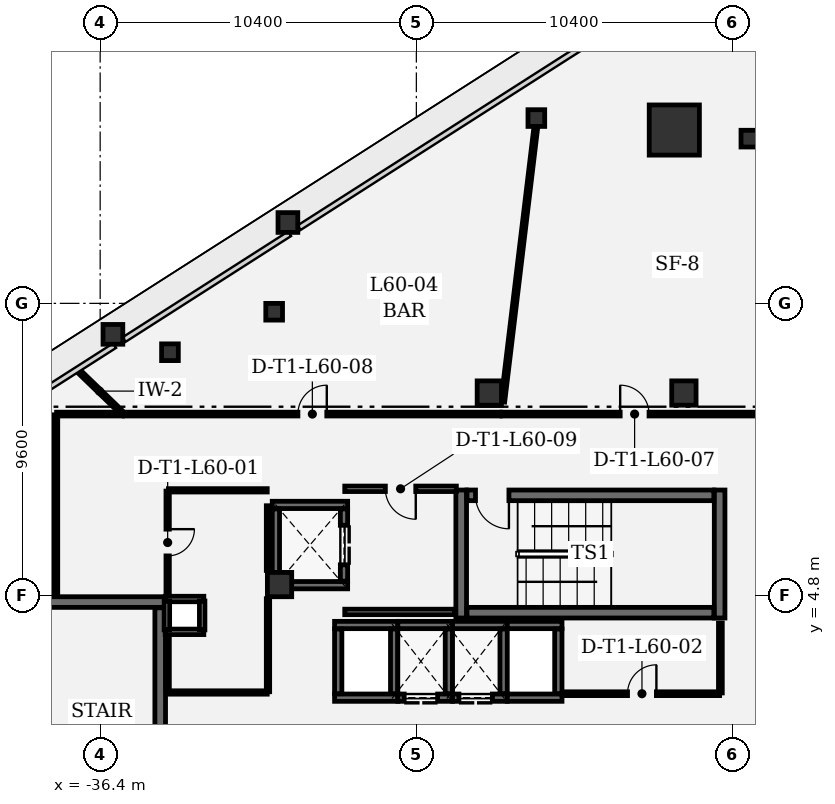
"""IFC4 building model, lengths in metres.
Left out: names, types, materials, properties, quantities, classifications, styles, units other than length and angle.
Written with IfcOpenShell. Run it as: python <this file> out.ifc"""

import sys

from ifc_helpers import new_model, si_unit, direction, frame, frame_2d, origin, origin_2d, place, context, subcontext, project, spatial, rectangle, extrude, element, fill, save


model = new_model("IFC4")
c1 = context("Model", 3, precision=1e-05, world=origin(), true_north=direction((0.0, 1.0)))
c2 = subcontext(c1, "Body", "Model", "MODEL_VIEW")
j1 = project(units=[si_unit("LENGTHUNIT", "METRE"), si_unit("PLANEANGLEUNIT", "RADIAN")], contexts=[c1])
p1 = place(None, origin())
s1 = spatial("IfcSite", under=j1, at=p1, CompositionType="ELEMENT")
p2 = place(p1, origin())
s2 = spatial("IfcBuilding", under=s1, at=p2, CompositionType="ELEMENT")
p3 = place(p2, frame((0.0, 0.0, 259.8)))
s3 = spatial("IfcBuildingStorey", under=s2, at=p3, CompositionType="ELEMENT", Elevation=259.8)
p4 = place(p3, frame((-17.515, 20.102, 0.0), z_axis=(0.0, 0.0, 1.0), x_axis=(1.0, 0.0, 0.0)))
e1 = element("IfcColumn", 1, at=p4, inside=s3, PredefinedType="COLUMN", context=c2, shape_type="SweptSolid", body=[
    extrude(rectangle(XDim=1.65, YDim=1.65, at=origin_2d()), origin(), (0.0, 0.0, 1.0), 4.2),
])
for number, where, z_axis, x_axis in (
    (2, (-23.6, 11.45, 0.0), (0.0, 0.0, 1.0), (1.0, 0.0, 0.0)),
    (3, (-17.2, 11.45, 0.0), (0.0, 0.0, 1.0), (1.0, 0.0, 0.0)),
    (4, (-30.5, 5.15, 0.0), (0.0, 0.0, 1.0), (1.0, 0.0, 0.0)),
):
    element("IfcColumn", number, at=place(p3, frame(where, z_axis=z_axis, x_axis=x_axis)), inside=s3, PredefinedType="COLUMN", context=c2, shape_type="SweptSolid", body=[
        extrude(rectangle(XDim=0.8, YDim=0.8, at=origin_2d()), origin(), (0.0, 0.0, 1.0), 4.2),
    ])
for number, where, z_axis, x_axis in (
    (5, (-35.981, 13.381, 0.0), (0.0, 0.0, 1.0), (1.0, 0.0, 0.0)),
    (6, (-30.225, 17.06, 0.0), (0.0, 0.0, 1.0), (1.0, 0.0, 0.0)),
):
    element("IfcColumn", number, at=place(p3, frame(where, z_axis=z_axis, x_axis=x_axis)), inside=s3, PredefinedType="COLUMN", context=c2, shape_type="SweptSolid", body=[
        extrude(rectangle(XDim=0.65, YDim=0.65, at=origin_2d()), origin(), (0.0, 0.0, 1.0), 4.2),
    ])
for number, where, z_axis, x_axis in (
    (7, (-34.104, 12.792, 0.0), (0.0, 0.0, 1.0), (1.0, 0.0, 0.0)),
    (8, (-22.053, 20.495, 0.0), (0.0, 0.0, 1.0), (1.0, 0.0, 0.0)),
    (9, (-30.677, 14.124, 0.0), (0.0, 0.0, 1.0), (1.0, 0.0, 0.0)),
    (10, (-15.046, 19.818, 0.0), (0.0, 0.0, 1.0), (1.0, 0.0, 0.0)),
):
    element("IfcColumn", number, at=place(p3, frame(where, z_axis=z_axis, x_axis=x_axis)), inside=s3, PredefinedType="COLUMN", context=c2, shape_type="SweptSolid", body=[
        extrude(rectangle(XDim=0.55, YDim=0.55, at=origin_2d()), origin(), (0.0, 0.0, 1.0), 4.2),
    ])
for number, where, z_axis, x_axis in (
    (11, (-24.525, 8.26, 0.0), (0.0, 0.0, 1.0), (0.0, -1.0, 0.0)),
    (12, (-16.025, 4.05, 0.0), (0.0, 0.0, 1.0), (0.0, 1.0, 0.0)),
):
    element("IfcWall", number, at=place(p3, frame(where, z_axis=z_axis, x_axis=x_axis)), inside=s3, PredefinedType="SHEAR", context=c2, shape_type="SweptSolid", body=[
        extrude(rectangle(XDim=4.21, YDim=0.35, at=frame_2d((2.105, 0.0))), origin(), (0.0, 0.0, 1.0), 3.91),
    ])
p5 = place(p3, frame((-24.335, 4.225, 0.0), z_axis=(0.0, 0.0, 1.0), x_axis=(1.0, 0.0, 0.0)))
e13 = element("IfcWall", 13, at=p5, inside=s3, PredefinedType="SHEAR", context=c2, shape_type="SweptSolid", body=[
    extrude(rectangle(XDim=8.12, YDim=0.35, at=frame_2d((4.06, 0.0))), origin(), (0.0, 0.0, 1.0), 3.91),
])
p6 = place(p3, frame((-16.215, 8.085, 0.0), z_axis=(0.0, 0.0, 1.0), x_axis=(-1.0, 0.0, 0.0)))
e14 = element("IfcWall", 14, at=p6, inside=s3, PredefinedType="SHEAR", context=c2, shape_type="SweptSolid", body=[
    extrude(rectangle(XDim=8.12, YDim=0.35, at=frame_2d((4.06, 0.0))), origin(), (0.0, 0.0, 1.0), 3.91),
])
p7 = place(p6, frame((6.74, 0.0, 0.0)))
e15 = element("IfcOpeningElement", 15, at=p7, cuts=e14, PredefinedType="OPENING", context=c2, shape_type="SweptSolid", body=[
    extrude(rectangle(XDim=1.1, YDim=2.2, at=frame_2d((0.55, 1.1))), frame((0.0, 0.185, 0.0), z_axis=(0.0, -1.0, 0.0), x_axis=(1.0, 0.0, 0.0)), (0.0, 0.0, 1.0), 0.37),
])
p8 = place(p3, frame((-34.25, 4.575, 0.0), z_axis=(0.0, 0.0, 1.0), x_axis=(-1.0, 0.0, 0.0)))
e16 = element("IfcWall", 16, at=p8, inside=s3, PredefinedType="SHEAR", context=c2, shape_type="SweptSolid", body=[
    extrude(rectangle(XDim=4.21, YDim=0.35, at=frame_2d((2.105, 0.0))), origin(), (0.0, 0.0, 1.0), 3.91),
])
p9 = place(p3, frame((-34.425, -4.385, 0.0), z_axis=(0.0, 0.0, 1.0), x_axis=(0.0, 1.0, 0.0)))
e17 = element("IfcWall", 17, at=p9, inside=s3, PredefinedType="SHEAR", context=c2, shape_type="SweptSolid", body=[
    extrude(rectangle(XDim=8.77, YDim=0.35, at=frame_2d((4.385, 0.0))), origin(), (0.0, 0.0, 1.0), 3.91),
])
for number, where, z_axis, x_axis in (
    (18, (-28.26, 5.13, 0.0), (0.0, 0.0, 1.0), (-1.0, 0.0, 0.0)),
    (19, (-30.74, 7.77, 0.0), (0.0, 0.0, 1.0), (1.0, 0.0, 0.0)),
):
    element("IfcWall", number, at=place(p3, frame(where, z_axis=z_axis, x_axis=x_axis)), inside=s3, PredefinedType="SHEAR", context=c2, shape_type="SweptSolid", body=[
        extrude(rectangle(XDim=2.48, YDim=0.24, at=frame_2d((1.24, 0.0))), origin(), (0.0, 0.0, 1.0), 3.91),
    ])
p10 = place(p3, frame((-30.62, 5.262, 0.0), z_axis=(0.0, 0.0, 1.0), x_axis=(0.0, 1.0, 0.0)))
e20 = element("IfcWall", 20, at=p10, inside=s3, PredefinedType="SHEAR", context=c2, shape_type="SweptSolid", body=[
    extrude(rectangle(XDim=2.376, YDim=0.24, at=frame_2d((1.188, 0.0))), origin(), (0.0, 0.0, 1.0), 3.91),
])
p11 = place(p3, frame((-28.38, 7.638, 0.0), z_axis=(0.0, 0.0, 1.0), x_axis=(0.0, -1.0, 0.0)))
e21 = element("IfcWall", 21, at=p11, inside=s3, PredefinedType="SHEAR", context=c2, shape_type="SweptSolid", body=[
    extrude(rectangle(XDim=2.376, YDim=0.24, at=frame_2d((1.188, 0.0))), origin(), (0.0, 0.0, 1.0), 3.91),
])
p12 = place(p11, frame((0.538, 0.0, 0.0)))
e22 = element("IfcOpeningElement", 22, at=p12, cuts=e21, PredefinedType="OPENING", context=c2, shape_type="SweptSolid", body=[
    extrude(rectangle(XDim=1.3, YDim=2.3, at=frame_2d((0.65, 1.15))), frame((0.0, 0.13, 0.0), z_axis=(0.0, -1.0, 0.0), x_axis=(1.0, 0.0, 0.0)), (0.0, 0.0, 1.0), 0.26),
])
for number, where, z_axis, x_axis in (
    (23, (-26.61, 1.43, 0.0), (0.0, 0.0, 1.0), (-1.0, 0.0, 0.0)),
    (24, (-28.69, 3.82, 0.0), (0.0, 0.0, 1.0), (1.0, 0.0, 0.0)),
):
    element("IfcWall", number, at=place(p3, frame(where, z_axis=z_axis, x_axis=x_axis)), inside=s3, PredefinedType="SHEAR", context=c2, shape_type="SweptSolid", body=[
        extrude(rectangle(XDim=2.08, YDim=0.24, at=frame_2d((1.04, 0.0))), origin(), (0.0, 0.0, 1.0), 3.91),
    ])
for number, where, z_axis, x_axis in (
    (25, (-28.57, 1.562, 0.0), (0.0, 0.0, 1.0), (0.0, 1.0, 0.0)),
    (26, (-26.73, 3.688, 0.0), (0.0, 0.0, 1.0), (0.0, -1.0, 0.0)),
):
    element("IfcWall", number, at=place(p3, frame(where, z_axis=z_axis, x_axis=x_axis)), inside=s3, PredefinedType="SHEAR", context=c2, shape_type="SweptSolid", body=[
        extrude(rectangle(XDim=2.126, YDim=0.24, at=frame_2d((1.063, 0.0))), origin(), (0.0, 0.0, 1.0), 3.91),
    ])
p13 = place(p3, frame((-24.81, 1.43, 0.0), z_axis=(0.0, 0.0, 1.0), x_axis=(-1.0, 0.0, 0.0)))
e27 = element("IfcWall", 27, at=p13, inside=s3, PredefinedType="SHEAR", context=c2, shape_type="SweptSolid", body=[
    extrude(rectangle(XDim=1.8, YDim=0.24, at=frame_2d((0.9, 0.0))), origin(), (0.0, 0.0, 1.0), 3.91),
])
p14 = place(p13, frame((0.49, 0.0, 0.0)))
e28 = element("IfcOpeningElement", 28, at=p14, cuts=e27, PredefinedType="OPENING", context=c2, shape_type="SweptSolid", body=[
    extrude(rectangle(XDim=1.1, YDim=2.2, at=frame_2d((0.55, 1.1))), frame((0.0, 0.13, 0.0), z_axis=(0.0, -1.0, 0.0), x_axis=(1.0, 0.0, 0.0)), (0.0, 0.0, 1.0), 0.26),
])
p15 = place(p3, frame((-26.61, 3.82, 0.0), z_axis=(0.0, 0.0, 1.0), x_axis=(1.0, 0.0, 0.0)))
e29 = element("IfcWall", 29, at=p15, inside=s3, PredefinedType="SHEAR", context=c2, shape_type="SweptSolid", body=[
    extrude(rectangle(XDim=1.8, YDim=0.24, at=frame_2d((0.9, 0.0))), origin(), (0.0, 0.0, 1.0), 3.91),
])
p16 = place(p3, frame((-24.93, 3.688, 0.0), z_axis=(0.0, 0.0, 1.0), x_axis=(0.0, -1.0, 0.0)))
e30 = element("IfcWall", 30, at=p16, inside=s3, PredefinedType="SHEAR", context=c2, shape_type="SweptSolid", body=[
    extrude(rectangle(XDim=2.126, YDim=0.24, at=frame_2d((1.063, 0.0))), origin(), (0.0, 0.0, 1.0), 3.91),
])
p17 = place(p3, frame((-23.01, 1.43, 0.0), z_axis=(0.0, 0.0, 1.0), x_axis=(-1.0, 0.0, 0.0)))
e31 = element("IfcWall", 31, at=p17, inside=s3, PredefinedType="SHEAR", context=c2, shape_type="SweptSolid", body=[
    extrude(rectangle(XDim=1.8, YDim=0.24, at=frame_2d((0.9, 0.0))), origin(), (0.0, 0.0, 1.0), 3.91),
])
p18 = place(p17, frame((0.49, 0.0, 0.0)))
e32 = element("IfcOpeningElement", 32, at=p18, cuts=e31, PredefinedType="OPENING", context=c2, shape_type="SweptSolid", body=[
    extrude(rectangle(XDim=1.1, YDim=2.2, at=frame_2d((0.55, 1.1))), frame((0.0, 0.13, 0.0), z_axis=(0.0, -1.0, 0.0), x_axis=(1.0, 0.0, 0.0)), (0.0, 0.0, 1.0), 0.26),
])
p19 = place(p3, frame((-24.81, 3.82, 0.0), z_axis=(0.0, 0.0, 1.0), x_axis=(1.0, 0.0, 0.0)))
e33 = element("IfcWall", 33, at=p19, inside=s3, PredefinedType="SHEAR", context=c2, shape_type="SweptSolid", body=[
    extrude(rectangle(XDim=1.8, YDim=0.24, at=frame_2d((0.9, 0.0))), origin(), (0.0, 0.0, 1.0), 3.91),
])
p20 = place(p3, frame((-23.13, 3.688, 0.0), z_axis=(0.0, 0.0, 1.0), x_axis=(0.0, -1.0, 0.0)))
e34 = element("IfcWall", 34, at=p20, inside=s3, PredefinedType="SHEAR", context=c2, shape_type="SweptSolid", body=[
    extrude(rectangle(XDim=2.126, YDim=0.24, at=frame_2d((1.063, 0.0))), origin(), (0.0, 0.0, 1.0), 3.91),
])
for number, where, z_axis, x_axis in (
    (35, (-21.21, 1.43, 0.0), (0.0, 0.0, 1.0), (-1.0, 0.0, 0.0)),
    (36, (-23.01, 3.82, 0.0), (0.0, 0.0, 1.0), (1.0, 0.0, 0.0)),
):
    element("IfcWall", number, at=place(p3, frame(where, z_axis=z_axis, x_axis=x_axis)), inside=s3, PredefinedType="SHEAR", context=c2, shape_type="SweptSolid", body=[
        extrude(rectangle(XDim=1.8, YDim=0.24, at=frame_2d((0.9, 0.0))), origin(), (0.0, 0.0, 1.0), 3.91),
    ])
p21 = place(p3, frame((-21.33, 3.688, 0.0), z_axis=(0.0, 0.0, 1.0), x_axis=(0.0, -1.0, 0.0)))
e37 = element("IfcWall", 37, at=p21, inside=s3, PredefinedType="SHEAR", context=c2, shape_type="SweptSolid", body=[
    extrude(rectangle(XDim=2.126, YDim=0.24, at=frame_2d((1.063, 0.0))), origin(), (0.0, 0.0, 1.0), 3.91),
])
for number, where, z_axis, x_axis in (
    (38, (-32.99, 3.595, 0.0), (0.0, 0.0, 1.0), (-1.0, 0.0, 0.0)),
    (39, (-34.26, 4.675, 0.0), (0.0, 0.0, 1.0), (1.0, 0.0, 0.0)),
):
    element("IfcWall", number, at=place(p3, frame(where, z_axis=z_axis, x_axis=x_axis)), inside=s3, PredefinedType="PARTITIONING", context=c2, shape_type="SweptSolid", body=[
        extrude(rectangle(XDim=1.27, YDim=0.18, at=frame_2d((0.635, 0.0))), origin(), (0.0, 0.0, 1.0), 3.91),
    ])
for number, where, z_axis, x_axis in (
    (40, (-34.205, 3.66, 0.0), (0.0, 0.0, 1.0), (0.0, 1.0, 0.0)),
    (41, (-33.045, 4.61, 0.0), (0.0, 0.0, 1.0), (0.0, -1.0, 0.0)),
):
    element("IfcWall", number, at=place(p3, frame(where, z_axis=z_axis, x_axis=x_axis)), inside=s3, PredefinedType="PARTITIONING", context=c2, shape_type="SweptSolid", body=[
        extrude(rectangle(XDim=0.95, YDim=0.18, at=frame_2d((0.475, 0.0))), origin(), (0.0, 0.0, 1.0), 3.91),
    ])
p22 = place(p3, frame((-28.355, 4.25, 0.0), z_axis=(0.0, 0.0, 1.0), x_axis=(1.0, 0.0, 0.0)))
e42 = element("IfcWall", 42, at=p22, inside=s3, PredefinedType="PARTITIONING", context=c2, shape_type="SweptSolid", body=[
    extrude(rectangle(XDim=3.622, YDim=0.18, at=frame_2d((1.811, 0.0))), origin(), (0.0, 0.0, 1.0), 3.91),
])
p23 = place(p3, frame((-24.684, 8.3, 0.0), z_axis=(0.0, 0.0, 1.0), x_axis=(-1.0, 0.0, 0.0)))
e43 = element("IfcWall", 43, at=p23, inside=s3, PredefinedType="PARTITIONING", context=c2, shape_type="SweptSolid", body=[
    extrude(rectangle(XDim=3.671, YDim=0.18, at=frame_2d((1.835, 0.0))), origin(), (0.0, 0.0, 1.0), 3.529),
])
p24 = place(p23, frame((1.335, 0.0, 0.0)))
e44 = element("IfcOpeningElement", 44, at=p24, cuts=e43, PredefinedType="OPENING", context=c2, shape_type="SweptSolid", body=[
    extrude(rectangle(XDim=1.0, YDim=2.15, at=frame_2d((0.5, 1.075))), frame((0.0, 0.1, 0.0), z_axis=(0.0, -1.0, 0.0), x_axis=(1.0, 0.0, 0.0)), (0.0, 0.0, 1.0), 0.2),
])
p25 = place(p3, frame((-34.155, 1.6, 0.0), z_axis=(0.0, 0.0, 1.0), x_axis=(1.0, 0.0, 0.0)))
e45 = element("IfcWall", 45, at=p25, inside=s3, PredefinedType="PARTITIONING", context=c2, shape_type="SweptSolid", body=[
    extrude(rectangle(XDim=3.25, YDim=0.11, at=frame_2d((1.625, 0.0))), origin(), (0.0, 0.0, 1.0), 3.91),
])
p26 = place(p3, frame((-30.88, 1.625, 0.0), z_axis=(0.0, 0.0, 1.0), x_axis=(0.0, 1.0, 0.0)))
e46 = element("IfcWall", 46, at=p26, inside=s3, PredefinedType="PARTITIONING", context=c2, shape_type="SweptSolid", body=[
    extrude(rectangle(XDim=3.06, YDim=0.11, at=frame_2d((1.53, 0.0))), origin(), (0.0, 0.0, 1.0), 3.91),
])
p27 = place(p3, frame((-30.88, 5.615, 0.0), z_axis=(0.0, 0.0, 1.0), x_axis=(0.0, 1.0, 0.0)))
e47 = element("IfcWall", 47, at=p27, inside=s3, PredefinedType="PARTITIONING", context=c2, shape_type="SweptSolid", body=[
    extrude(rectangle(XDim=2.128, YDim=0.11, at=frame_2d((1.064, 0.0))), origin(), (0.0, 0.0, 1.0), 3.91),
])
p28 = place(p3, frame((-30.905, 8.25, 0.0), z_axis=(0.0, 0.0, 1.0), x_axis=(-1.0, 0.0, 0.0)))
e48 = element("IfcWall", 48, at=p28, inside=s3, PredefinedType="PARTITIONING", context=c2, shape_type="SweptSolid", body=[
    extrude(rectangle(XDim=3.25, YDim=0.11, at=frame_2d((1.625, 0.0))), origin(), (0.0, 0.0, 1.0), 3.529),
])
p29 = place(p3, frame((-34.18, 8.225, 0.0), z_axis=(0.0, 0.0, 1.0), x_axis=(0.0, -1.0, 0.0)))
e49 = element("IfcWall", 49, at=p29, inside=s3, PredefinedType="PARTITIONING", context=c2, shape_type="SweptSolid", body=[
    extrude(rectangle(XDim=3.385, YDim=0.11, at=frame_2d((1.692, 0.0))), origin(), (0.0, 0.0, 1.0), 3.91),
])
p30 = place(p29, frame((1.252, 0.0, 0.0)))
e50 = element("IfcOpeningElement", 50, at=p30, cuts=e49, PredefinedType="OPENING", context=c2, shape_type="SweptSolid", body=[
    extrude(rectangle(XDim=0.88, YDim=2.1, at=frame_2d((0.44, 1.05))), frame((0.0, 0.065, 0.0), z_axis=(0.0, -1.0, 0.0), x_axis=(1.0, 0.0, 0.0)), (0.0, 0.0, 1.0), 0.13),
])
p31 = place(p3, frame((-34.18, 3.43, 0.0), z_axis=(0.0, 0.0, 1.0), x_axis=(0.0, -1.0, 0.0)))
e51 = element("IfcWall", 51, at=p31, inside=s3, PredefinedType="PARTITIONING", context=c2, shape_type="SweptSolid", body=[
    extrude(rectangle(XDim=1.805, YDim=0.11, at=frame_2d((0.902, 0.0))), origin(), (0.0, 0.0, 1.0), 3.91),
])
p32 = place(p3, frame((-21.134, 1.56, 0.0), z_axis=(0.0, 0.0, 1.0), x_axis=(1.0, 0.0, 0.0)))
e52 = element("IfcWall", 52, at=p32, inside=s3, PredefinedType="PARTITIONING", context=c2, shape_type="SweptSolid", body=[
    extrude(rectangle(XDim=5.109, YDim=0.125, at=frame_2d((2.554, 0.0))), origin(), (0.0, 0.0, 1.0), 3.91),
])
p33 = place(p32, frame((2.079, 0.0, 0.0)))
e53 = element("IfcOpeningElement", 53, at=p33, cuts=e52, PredefinedType="OPENING", context=c2, shape_type="SweptSolid", body=[
    extrude(rectangle(XDim=0.95, YDim=2.15, at=frame_2d((0.475, 1.075))), frame((0.0, 0.073, 0.0), z_axis=(0.0, -1.0, 0.0), x_axis=(1.0, 0.0, 0.0)), (0.0, 0.0, 1.0), 0.145),
])
p34 = place(p3, frame((-16.0, 1.585, 0.0), z_axis=(0.0, 0.0, 1.0), x_axis=(0.0, 1.0, 0.0)))
e54 = element("IfcWall", 54, at=p34, inside=s3, PredefinedType="PARTITIONING", context=c2, shape_type="SweptSolid", body=[
    extrude(rectangle(XDim=2.302, YDim=0.125, at=frame_2d((1.151, 0.0))), origin(), (0.0, 0.0, 1.0), 3.91),
])
p35 = place(p3, frame((-37.858, 10.733, 0.0), z_axis=(0.0, 0.0, 1.0), x_axis=(0.0, -1.0, 0.0)))
e55 = element("IfcWall", 55, at=p35, inside=s3, PredefinedType="PARTITIONING", context=c2, shape_type="SweptSolid", body=[
    extrude(rectangle(XDim=5.95, YDim=0.125, at=frame_2d((2.975, 0.0))), origin(), (0.0, 0.0, 1.0), 3.91),
])
p36 = place(p3, frame((-35.665, 10.758, 0.0), z_axis=(0.0, 0.0, 1.0), x_axis=(-1.0, 0.0, 0.0)))
e56 = element("IfcWall", 56, at=p36, inside=s3, PredefinedType="PARTITIONING", context=c2, shape_type="SweptSolid", body=[
    extrude(rectangle(XDim=2.168, YDim=0.125, at=frame_2d((1.084, 0.0))), origin(), (0.0, 0.0, 1.0), 3.91),
])
p37 = place(p3, frame((-35.746, 10.86, 0.0), z_axis=(0.0, 0.0, 1.0), x_axis=(-0.719327666051, 0.694670935662, 0.0)))
e57 = element("IfcWall", 57, at=p37, inside=s3, PredefinedType="PARTITIONING", context=c2, shape_type="SweptSolid", body=[
    extrude(rectangle(XDim=1.881, YDim=0.125, at=frame_2d((0.941, 0.0))), origin(), (0.0, 0.0, 1.0), 3.91),
])
p38 = place(p3, frame((-23.18, 10.758, 0.0), z_axis=(0.0, 0.0, 1.0), x_axis=(1.0, 0.0, 0.0)))
e58 = element("IfcWall", 58, at=p38, inside=s3, PredefinedType="PARTITIONING", context=c2, shape_type="SweptSolid", body=[
    extrude(rectangle(XDim=10.013, YDim=0.125, at=frame_2d((5.007, 0.0))), origin(), (0.0, 0.0, 1.0), 3.529),
])
p39 = place(p38, frame((3.884, 0.0, 0.0)))
e59 = element("IfcOpeningElement", 59, at=p39, cuts=e58, PredefinedType="OPENING", context=c2, shape_type="SweptSolid", body=[
    extrude(rectangle(XDim=0.95, YDim=2.15, at=frame_2d((0.475, 1.075))), frame((0.0, 0.073, 0.0), z_axis=(0.0, -1.0, 0.0), x_axis=(1.0, 0.0, 0.0)), (0.0, 0.0, 1.0), 0.145),
])
p40 = place(p3, frame((-22.074, 20.155, 0.0), z_axis=(0.0, 0.0, 1.0), x_axis=(-0.119476721167, -0.992837002281, 0.0)))
e60 = element("IfcWall", 60, at=p40, inside=s3, PredefinedType="PARTITIONING", context=c2, shape_type="SweptSolid", body=[
    extrude(rectangle(XDim=9.061, YDim=0.125, at=frame_2d((4.53, 0.0))), origin(), (0.0, 0.0, 1.0), 3.107),
])
p41 = place(p3, frame((-35.604, 10.758, 0.0), z_axis=(0.0, 0.0, 1.0), x_axis=(1.0, 0.0, 0.0)))
e61 = element("IfcWall", 61, at=p41, inside=s3, PredefinedType="PARTITIONING", context=c2, shape_type="SweptSolid", body=[
    extrude(rectangle(XDim=12.365, YDim=0.125, at=frame_2d((6.183, 0.0))), origin(), (0.0, 0.0, 1.0), 3.13),
])
p42 = place(p41, frame((5.708, 0.0, 0.0)))
e62 = element("IfcOpeningElement", 62, at=p42, cuts=e61, PredefinedType="OPENING", context=c2, shape_type="SweptSolid", body=[
    extrude(rectangle(XDim=0.95, YDim=2.15, at=frame_2d((0.475, 1.075))), frame((0.0, 0.073, 0.0), z_axis=(0.0, -1.0, 0.0), x_axis=(1.0, 0.0, 0.0)), (0.0, 0.0, 1.0), 0.145),
])
p43 = place(p7, origin())
e63 = element("IfcDoor", 63, at=p43, inside=s3, OperationType="SINGLE_SWING_LEFT", PredefinedType="DOOR", context=c2, shape_type="SweptSolid", body=[
    extrude(rectangle(XDim=1.1, YDim=2.2, at=frame_2d((0.55, 1.1))), frame((0.0, 0.025, 0.0), z_axis=(0.0, -1.0, 0.0), x_axis=(1.0, 0.0, 0.0)), (0.0, 0.0, 1.0), 0.05),
])
fill(e15, e63)
p44 = place(p12, origin())
e64 = element("IfcDoor", 64, at=p44, inside=s3, OperationType="DOUBLE_DOOR_SLIDING", PredefinedType="DOOR", context=c2, shape_type="SweptSolid", body=[
    extrude(rectangle(XDim=1.3, YDim=2.3, at=frame_2d((0.65, 1.15))), frame((0.0, 0.025, 0.0), z_axis=(0.0, -1.0, 0.0), x_axis=(1.0, 0.0, 0.0)), (0.0, 0.0, 1.0), 0.05),
])
fill(e22, e64)
p45 = place(p14, origin())
e65 = element("IfcDoor", 65, at=p45, inside=s3, OperationType="DOUBLE_DOOR_SLIDING", PredefinedType="DOOR", context=c2, shape_type="SweptSolid", body=[
    extrude(rectangle(XDim=1.1, YDim=2.2, at=frame_2d((0.55, 1.1))), frame((0.0, 0.025, 0.0), z_axis=(0.0, -1.0, 0.0), x_axis=(1.0, 0.0, 0.0)), (0.0, 0.0, 1.0), 0.05),
])
fill(e28, e65)
p46 = place(p18, origin())
e66 = element("IfcDoor", 66, at=p46, inside=s3, OperationType="DOUBLE_DOOR_SLIDING", PredefinedType="DOOR", context=c2, shape_type="SweptSolid", body=[
    extrude(rectangle(XDim=1.1, YDim=2.2, at=frame_2d((0.55, 1.1))), frame((0.0, 0.025, 0.0), z_axis=(0.0, -1.0, 0.0), x_axis=(1.0, 0.0, 0.0)), (0.0, 0.0, 1.0), 0.05),
])
fill(e32, e66)
p47 = place(p30, origin())
e67 = element("IfcDoor", 67, at=p47, inside=s3, OperationType="SINGLE_SWING_LEFT", PredefinedType="DOOR", context=c2, shape_type="SweptSolid", body=[
    extrude(rectangle(XDim=0.88, YDim=2.1, at=frame_2d((0.44, 1.05))), frame((0.0, 0.025, 0.0), z_axis=(0.0, -1.0, 0.0), x_axis=(1.0, 0.0, 0.0)), (0.0, 0.0, 1.0), 0.05),
])
fill(e50, e67)
p48 = place(p33, origin())
e68 = element("IfcDoor", 68, at=p48, inside=s3, OperationType="SINGLE_SWING_RIGHT", PredefinedType="DOOR", context=c2, shape_type="SweptSolid", body=[
    extrude(rectangle(XDim=0.95, YDim=2.15, at=frame_2d((0.475, 1.075))), frame((0.0, 0.025, 0.0), z_axis=(0.0, -1.0, 0.0), x_axis=(1.0, 0.0, 0.0)), (0.0, 0.0, 1.0), 0.05),
])
fill(e53, e68)
p49 = place(p39, origin())
e69 = element("IfcDoor", 69, at=p49, inside=s3, OperationType="SINGLE_SWING_LEFT", PredefinedType="DOOR", context=c2, shape_type="SweptSolid", body=[
    extrude(rectangle(XDim=0.95, YDim=2.15, at=frame_2d((0.475, 1.075))), frame((0.0, 0.025, 0.0), z_axis=(0.0, -1.0, 0.0), x_axis=(1.0, 0.0, 0.0)), (0.0, 0.0, 1.0), 0.05),
])
fill(e59, e69)
p50 = place(p42, origin())
e70 = element("IfcDoor", 70, at=p50, inside=s3, OperationType="SINGLE_SWING_RIGHT", PredefinedType="DOOR", context=c2, shape_type="SweptSolid", body=[
    extrude(rectangle(XDim=0.95, YDim=2.15, at=frame_2d((0.475, 1.075))), frame((0.0, 0.025, 0.0), z_axis=(0.0, -1.0, 0.0), x_axis=(1.0, 0.0, 0.0)), (0.0, 0.0, 1.0), 0.05),
])
fill(e62, e70)
p51 = place(p24, origin())
e71 = element("IfcDoor", 71, at=p51, inside=s3, OperationType="SINGLE_SWING_LEFT", PredefinedType="DOOR", context=c2, shape_type="SweptSolid", body=[
    extrude(rectangle(XDim=1.0, YDim=2.15, at=frame_2d((0.5, 1.075))), frame((0.0, 0.025, 0.0), z_axis=(0.0, -1.0, 0.0), x_axis=(1.0, 0.0, 0.0)), (0.0, 0.0, 1.0), 0.05),
])
fill(e44, e71)
save(model, sys.argv[1])
